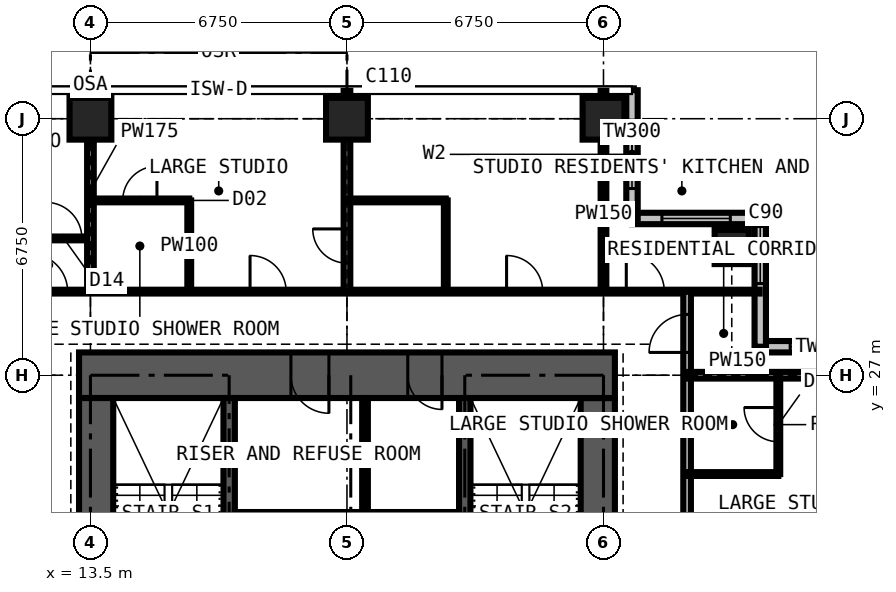
"""IFC4 building model, lengths in metres.
Left out: names, types, materials, properties, quantities, classifications, styles, units other than length and angle.
Written with IfcOpenShell. Run it as: python <this file> out.ifc"""

import sys

from ifc_helpers import new_model, si_unit, direction, frame, frame_2d, origin, origin_2d, place, context, subcontext, project, spatial, rectangle, extrude, element, fill, save


model = new_model("IFC4")
c1 = context("Model", 3, precision=1e-05, world=origin(), true_north=direction((0.0, 1.0)))
c2 = subcontext(c1, "Body", "Model", "MODEL_VIEW")
j1 = project(units=[si_unit("LENGTHUNIT", "METRE"), si_unit("PLANEANGLEUNIT", "RADIAN")], contexts=[c1])
p1 = place(None, origin())
s1 = spatial("IfcSite", under=j1, at=p1, CompositionType="ELEMENT")
p2 = place(p1, origin())
s2 = spatial("IfcBuilding", under=s1, at=p2, CompositionType="ELEMENT")
p3 = place(p2, frame((0.0, 0.0, 215.1)))
s3 = spatial("IfcBuildingStorey", under=s2, at=p3, CompositionType="ELEMENT", Elevation=215.1)
for number, where, z_axis, x_axis in (
    (1, (13.5, 33.75, 0.0), (0.0, 0.0, 1.0), (1.0, 0.0, 0.0)),
    (2, (20.25, 33.75, 0.0), (0.0, 0.0, 1.0), (1.0, 0.0, 0.0)),
    (3, (27.0, 33.75, 0.0), (0.0, 0.0, 1.0), (1.0, 0.0, 0.0)),
):
    element("IfcColumn", number, at=place(p3, frame(where, z_axis=z_axis, x_axis=x_axis)), inside=s3, PredefinedType="COLUMN", context=c2, shape_type="SweptSolid", body=[
        extrude(rectangle(XDim=1.1, YDim=1.1, at=origin_2d()), origin(), (0.0, 0.0, 1.0), 3.6),
    ])
p4 = place(p3, frame((30.375, 30.375, 0.0), z_axis=(0.0, 0.0, 1.0), x_axis=(1.0, 0.0, 0.0)))
e4 = element("IfcColumn", 4, at=p4, inside=s3, PredefinedType="COLUMN", context=c2, shape_type="SweptSolid", body=[
    extrude(rectangle(XDim=0.9, YDim=0.9, at=origin_2d()), origin(), (0.0, 0.0, 1.0), 3.6),
])
p5 = place(p3, frame((26.85, 14.1, 0.0), z_axis=(0.0, 0.0, 1.0), x_axis=(0.0, 1.0, 0.0)))
e5 = element("IfcWall", 5, at=p5, inside=s3, PredefinedType="SHEAR", context=c2, shape_type="SweptSolid", body=[
    extrude(rectangle(XDim=12.3, YDim=0.9, at=frame_2d((6.15, 0.0))), origin(), (0.0, 0.0, 1.0), 3.6),
])
p6 = place(p5, frame((3.65, 0.0, 0.0)))
e6 = element("IfcOpeningElement", 6, at=p6, cuts=e5, PredefinedType="OPENING", context=c2, shape_type="SweptSolid", body=[
    extrude(rectangle(XDim=1.2, YDim=2.2, at=frame_2d((0.6, 1.1))), frame((0.0, 0.46, 0.0), z_axis=(0.0, -1.0, 0.0), x_axis=(1.0, 0.0, 0.0)), (0.0, 0.0, 1.0), 0.92),
])
p7 = place(p3, frame((27.3, 27.0, 0.0), z_axis=(0.0, 0.0, 1.0), x_axis=(-1.0, 0.0, 0.0)))
e7 = element("IfcWall", 7, at=p7, inside=s3, PredefinedType="SHEAR", context=c2, shape_type="SweptSolid", body=[
    extrude(rectangle(XDim=14.1, YDim=1.2, at=frame_2d((7.05, 0.0))), origin(), (0.0, 0.0, 1.0), 3.6),
])
p8 = place(p7, frame((4.55, 0.0, 0.0)))
e8 = element("IfcOpeningElement", 8, at=p8, cuts=e7, PredefinedType="OPENING", context=c2, shape_type="SweptSolid", body=[
    extrude(rectangle(XDim=0.9, YDim=2.2, at=frame_2d((0.45, 1.1))), frame((0.0, 0.61, 0.0), z_axis=(0.0, -1.0, 0.0), x_axis=(1.0, 0.0, 0.0)), (0.0, 0.0, 1.0), 1.22),
])
p9 = place(p7, frame((7.525, 0.0, 0.0)))
e9 = element("IfcOpeningElement", 9, at=p9, cuts=e7, PredefinedType="OPENING", context=c2, shape_type="SweptSolid", body=[
    extrude(rectangle(XDim=1.0, YDim=2.2, at=frame_2d((0.5, 1.1))), frame((0.0, 0.61, 0.0), z_axis=(0.0, -1.0, 0.0), x_axis=(1.0, 0.0, 0.0)), (0.0, 0.0, 1.0), 1.22),
])
p10 = place(p3, frame((13.65, 26.4, 0.0), z_axis=(0.0, 0.0, 1.0), x_axis=(0.0, -1.0, 0.0)))
e10 = element("IfcWall", 10, at=p10, inside=s3, PredefinedType="SHEAR", context=c2, shape_type="SweptSolid", body=[
    extrude(rectangle(XDim=12.3, YDim=0.9, at=frame_2d((6.15, 0.0))), origin(), (0.0, 0.0, 1.0), 3.6),
])
p11 = place(p10, frame((7.45, 0.0, 0.0)))
e11 = element("IfcOpeningElement", 11, at=p11, cuts=e10, PredefinedType="OPENING", context=c2, shape_type="SweptSolid", body=[
    extrude(rectangle(XDim=1.2, YDim=2.2, at=frame_2d((0.6, 1.1))), frame((0.0, 0.46, 0.0), z_axis=(0.0, -1.0, 0.0), x_axis=(1.0, 0.0, 0.0)), (0.0, 0.0, 1.0), 0.92),
])
p12 = place(p3, frame((34.5, 27.75, 0.0), z_axis=(0.0, 0.0, 1.0), x_axis=(-1.0, 0.0, 0.0)))
e12 = element("IfcWall", 12, at=p12, inside=s3, PredefinedType="SOLIDWALL", context=c2, shape_type="SweptSolid", body=[
    extrude(rectangle(XDim=3.375, YDim=0.3, at=frame_2d((1.688, 0.0))), origin(), (0.0, 0.0, 1.0), 3.375),
])
p13 = place(p12, frame((0.788, 0.0, 0.6)))
e13 = element("IfcOpeningElement", 13, at=p13, cuts=e12, PredefinedType="OPENING", context=c2, shape_type="SweptSolid", body=[
    extrude(rectangle(XDim=1.8, YDim=2.1, at=frame_2d((0.9, 1.05))), frame((0.0, 0.16, 0.0), z_axis=(0.0, -1.0, 0.0), x_axis=(1.0, 0.0, 0.0)), (0.0, 0.0, 1.0), 0.32),
])
p14 = place(p3, frame((31.125, 27.75, 0.0), z_axis=(0.0, 0.0, 1.0), x_axis=(0.0, 1.0, 0.0)))
e14 = element("IfcWall", 14, at=p14, inside=s3, PredefinedType="SOLIDWALL", context=c2, shape_type="SweptSolid", body=[
    extrude(rectangle(XDim=3.375, YDim=0.3, at=frame_2d((1.688, 0.0))), origin(), (0.0, 0.0, 1.0), 3.375),
])
p15 = place(p14, frame((1.663, 0.0, 0.9)))
e15 = element("IfcOpeningElement", 15, at=p15, cuts=e14, PredefinedType="OPENING", context=c2, shape_type="SweptSolid", body=[
    extrude(rectangle(XDim=1.5, YDim=1.8, at=frame_2d((0.75, 0.9))), frame((0.0, 0.16, 0.0), z_axis=(0.0, -1.0, 0.0), x_axis=(1.0, 0.0, 0.0)), (0.0, 0.0, 1.0), 0.32),
])
p16 = place(p3, frame((31.125, 31.125, 0.0), z_axis=(0.0, 0.0, 1.0), x_axis=(-1.0, 0.0, 0.0)))
e16 = element("IfcWall", 16, at=p16, inside=s3, PredefinedType="SOLIDWALL", context=c2, shape_type="SweptSolid", body=[
    extrude(rectangle(XDim=3.375, YDim=0.3, at=frame_2d((1.688, 0.0))), origin(), (0.0, 0.0, 1.0), 3.375),
])
p17 = place(p16, frame((0.788, 0.0, 0.6)))
e17 = element("IfcOpeningElement", 17, at=p17, cuts=e16, PredefinedType="OPENING", context=c2, shape_type="SweptSolid", body=[
    extrude(rectangle(XDim=1.8, YDim=2.1, at=frame_2d((0.9, 1.05))), frame((0.0, 0.16, 0.0), z_axis=(0.0, -1.0, 0.0), x_axis=(1.0, 0.0, 0.0)), (0.0, 0.0, 1.0), 0.32),
])
p18 = place(p3, frame((27.75, 31.125, 0.0), z_axis=(0.0, 0.0, 1.0), x_axis=(0.0, 1.0, 0.0)))
e18 = element("IfcWall", 18, at=p18, inside=s3, PredefinedType="SOLIDWALL", context=c2, shape_type="SweptSolid", body=[
    extrude(rectangle(XDim=3.375, YDim=0.3, at=frame_2d((1.688, 0.0))), origin(), (0.0, 0.0, 1.0), 3.375),
])
p19 = place(p18, frame((0.788, 0.0, 0.6)))
e19 = element("IfcOpeningElement", 19, at=p19, cuts=e18, PredefinedType="OPENING", context=c2, shape_type="SweptSolid", body=[
    extrude(rectangle(XDim=1.8, YDim=2.1, at=frame_2d((0.9, 1.05))), frame((0.0, 0.16, 0.0), z_axis=(0.0, -1.0, 0.0), x_axis=(1.0, 0.0, 0.0)), (0.0, 0.0, 1.0), 0.32),
])
for number, where, z_axis, x_axis in (
    (20, (17.15, 20.3, 0.0), (0.0, 0.0, 1.0), (0.0, 1.0, 0.0)),
    (21, (23.35, 20.3, 0.0), (0.0, 0.0, 1.0), (0.0, 1.0, 0.0)),
):
    element("IfcWall", number, at=place(p3, frame(where, z_axis=z_axis, x_axis=x_axis)), inside=s3, PredefinedType="SHEAR", context=c2, shape_type="SweptSolid", body=[
        extrude(rectangle(XDim=6.1, YDim=0.3, at=frame_2d((3.05, 0.0))), origin(), (0.0, 0.0, 1.0), 3.6),
    ])
p20 = place(p3, frame((17.3, 23.25, 0.0), z_axis=(0.0, 0.0, 1.0), x_axis=(1.0, 0.0, 0.0)))
e22 = element("IfcWall", 22, at=p20, inside=s3, PredefinedType="SHEAR", context=c2, shape_type="SweptSolid", body=[
    extrude(rectangle(XDim=5.9, YDim=0.3, at=frame_2d((2.95, 0.0))), origin(), (0.0, 0.0, 1.0), 3.6),
])
p21 = place(p3, frame((20.725, 23.4, 0.0), z_axis=(0.0, 0.0, 1.0), x_axis=(0.0, 1.0, 0.0)))
e23 = element("IfcWall", 23, at=p21, inside=s3, PredefinedType="PARTITIONING", context=c2, shape_type="SweptSolid", body=[
    extrude(rectangle(XDim=3.0, YDim=0.15, at=frame_2d((1.5, 0.0))), origin(), (0.0, 0.0, 1.0), 3.375),
])
p22 = place(p3, frame((10.125, 30.6, 0.0), z_axis=(0.0, 0.0, 1.0), x_axis=(1.0, 0.0, 0.0)))
e24 = element("IfcWall", 24, at=p22, inside=s3, PredefinedType="PARTITIONING", context=c2, shape_type="SweptSolid", body=[
    extrude(rectangle(XDim=3.375, YDim=0.1, at=frame_2d((1.688, 0.0))), origin(), (0.0, 0.0, 1.0), 3.375),
])
p23 = place(p22, frame((2.2, 0.0, 0.0)))
e25 = element("IfcOpeningElement", 25, at=p23, cuts=e24, PredefinedType="OPENING", context=c2, shape_type="SweptSolid", body=[
    extrude(rectangle(XDim=0.95, YDim=2.2, at=frame_2d((0.475, 1.1))), frame((0.0, 0.06, 0.0), z_axis=(0.0, -1.0, 0.0), x_axis=(1.0, 0.0, 0.0)), (0.0, 0.0, 1.0), 0.12),
])
p24 = place(p3, frame((11.3, 29.2, 0.0), z_axis=(0.0, 0.0, 1.0), x_axis=(1.0, 0.0, 0.0)))
e26 = element("IfcWall", 26, at=p24, inside=s3, PredefinedType="PARTITIONING", context=c2, shape_type="SweptSolid", body=[
    extrude(rectangle(XDim=19.809, YDim=0.1, at=frame_2d((9.904, 0.0))), origin(), (0.0, 0.0, 1.0), 3.375),
])
p25 = place(p24, frame((16.3, 0.0, 0.0)))
e27 = element("IfcOpeningElement", 27, at=p25, cuts=e26, PredefinedType="OPENING", context=c2, shape_type="SweptSolid", body=[
    extrude(rectangle(XDim=1.0, YDim=2.2, at=frame_2d((0.5, 1.1))), frame((0.0, 0.06, 0.0), z_axis=(0.0, -1.0, 0.0), x_axis=(1.0, 0.0, 0.0)), (0.0, 0.0, 1.0), 0.12),
])
p26 = place(p24, frame((6.4, 0.0, 0.0)))
e28 = element("IfcOpeningElement", 28, at=p26, cuts=e26, PredefinedType="OPENING", context=c2, shape_type="SweptSolid", body=[
    extrude(rectangle(XDim=0.95, YDim=2.2, at=frame_2d((0.475, 1.1))), frame((0.0, 0.06, 0.0), z_axis=(0.0, -1.0, 0.0), x_axis=(1.0, 0.0, 0.0)), (0.0, 0.0, 1.0), 0.12),
])
p27 = place(p24, frame((13.15, 0.0, 0.0)))
e29 = element("IfcOpeningElement", 29, at=p27, cuts=e26, PredefinedType="OPENING", context=c2, shape_type="SweptSolid", body=[
    extrude(rectangle(XDim=0.95, YDim=2.2, at=frame_2d((0.475, 1.1))), frame((0.0, 0.06, 0.0), z_axis=(0.0, -1.0, 0.0), x_axis=(1.0, 0.0, 0.0)), (0.0, 0.0, 1.0), 0.12),
])
p28 = place(p24, frame((0.6, 0.0, 0.0)))
e30 = element("IfcOpeningElement", 30, at=p28, cuts=e26, PredefinedType="OPENING", context=c2, shape_type="SweptSolid", body=[
    extrude(rectangle(XDim=1.0, YDim=2.2, at=frame_2d((0.5, 1.1))), frame((0.0, 0.06, 0.0), z_axis=(0.0, -1.0, 0.0), x_axis=(1.0, 0.0, 0.0)), (0.0, 0.0, 1.0), 0.12),
])
p29 = place(p3, frame((13.5, 29.2, 0.0), z_axis=(0.0, 0.0, 1.0), x_axis=(0.0, 1.0, 0.0)))
e31 = element("IfcWall", 31, at=p29, inside=s3, PredefinedType="PARTITIONING", context=c2, shape_type="SweptSolid", body=[
    extrude(rectangle(XDim=5.284, YDim=0.175, at=frame_2d((2.642, 0.0))), origin(), (0.0, 0.0, 1.0), 2.61),
])
p30 = place(p3, frame((13.5, 31.6, 0.0), z_axis=(0.0, 0.0, 1.0), x_axis=(1.0, 0.0, 0.0)))
e32 = element("IfcWall", 32, at=p30, inside=s3, PredefinedType="PARTITIONING", context=c2, shape_type="SweptSolid", body=[
    extrude(rectangle(XDim=2.6, YDim=0.1, at=frame_2d((1.3, 0.0))), origin(), (0.0, 0.0, 1.0), 3.375),
])
p31 = place(p30, frame((0.85, 0.0, 0.0)))
e33 = element("IfcOpeningElement", 33, at=p31, cuts=e32, PredefinedType="OPENING", context=c2, shape_type="SweptSolid", body=[
    extrude(rectangle(XDim=0.9, YDim=2.2, at=frame_2d((0.45, 1.1))), frame((0.0, 0.06, 0.0), z_axis=(0.0, -1.0, 0.0), x_axis=(1.0, 0.0, 0.0)), (0.0, 0.0, 1.0), 0.12),
])
p32 = place(p3, frame((16.1, 29.2, 0.0), z_axis=(0.0, 0.0, 1.0), x_axis=(0.0, 1.0, 0.0)))
e34 = element("IfcWall", 34, at=p32, inside=s3, PredefinedType="PARTITIONING", context=c2, shape_type="SweptSolid", body=[
    extrude(rectangle(XDim=2.4, YDim=0.1, at=frame_2d((1.2, 0.0))), origin(), (0.0, 0.0, 1.0), 3.375),
])
p33 = place(p3, frame((20.25, 29.2, 0.0), z_axis=(0.0, 0.0, 1.0), x_axis=(0.0, 1.0, 0.0)))
e35 = element("IfcWall", 35, at=p33, inside=s3, PredefinedType="PARTITIONING", context=c2, shape_type="SweptSolid", body=[
    extrude(rectangle(XDim=5.284, YDim=0.175, at=frame_2d((2.642, 0.0))), origin(), (0.0, 0.0, 1.0), 2.61),
])
p34 = place(p33, frame((0.75, 0.0, 0.0)))
e36 = element("IfcOpeningElement", 36, at=p34, cuts=e35, PredefinedType="OPENING", context=c2, shape_type="SweptSolid", body=[
    extrude(rectangle(XDim=0.9, YDim=2.2, at=frame_2d((0.45, 1.1))), frame((0.0, 0.097, 0.0), z_axis=(0.0, -1.0, 0.0), x_axis=(1.0, 0.0, 0.0)), (0.0, 0.0, 1.0), 0.195),
])
p35 = place(p3, frame((20.25, 31.6, 0.0), z_axis=(0.0, 0.0, 1.0), x_axis=(1.0, 0.0, 0.0)))
e37 = element("IfcWall", 37, at=p35, inside=s3, PredefinedType="PARTITIONING", context=c2, shape_type="SweptSolid", body=[
    extrude(rectangle(XDim=2.6, YDim=0.1, at=frame_2d((1.3, 0.0))), origin(), (0.0, 0.0, 1.0), 3.375),
])
p36 = place(p3, frame((22.85, 29.2, 0.0), z_axis=(0.0, 0.0, 1.0), x_axis=(0.0, 1.0, 0.0)))
e38 = element("IfcWall", 38, at=p36, inside=s3, PredefinedType="PARTITIONING", context=c2, shape_type="SweptSolid", body=[
    extrude(rectangle(XDim=2.4, YDim=0.1, at=frame_2d((1.2, 0.0))), origin(), (0.0, 0.0, 1.0), 3.375),
])
p37 = place(p3, frame((27.0, 29.2, 0.0), z_axis=(0.0, 0.0, 1.0), x_axis=(0.0, 1.0, 0.0)))
e39 = element("IfcWall", 39, at=p37, inside=s3, PredefinedType="PARTITIONING", context=c2, shape_type="SweptSolid", body=[
    extrude(rectangle(XDim=5.284, YDim=0.15, at=frame_2d((2.642, 0.0))), origin(), (0.0, 0.0, 1.0), 2.877),
])
p38 = place(p3, frame((29.2, 11.3, 0.0), z_axis=(0.0, 0.0, 1.0), x_axis=(0.0, 1.0, 0.0)))
e40 = element("IfcWall", 40, at=p38, inside=s3, PredefinedType="PARTITIONING", context=c2, shape_type="SweptSolid", body=[
    extrude(rectangle(XDim=17.9, YDim=0.2, at=frame_2d((8.95, 0.0))), origin(), (0.0, 0.0, 1.0), 3.375),
])
p39 = place(p38, frame((0.6, 0.0, 0.0)))
e41 = element("IfcOpeningElement", 41, at=p39, cuts=e40, PredefinedType="OPENING", context=c2, shape_type="SweptSolid", body=[
    extrude(rectangle(XDim=1.0, YDim=2.2, at=frame_2d((0.5, 1.1))), frame((0.0, 0.11, 0.0), z_axis=(0.0, -1.0, 0.0), x_axis=(1.0, 0.0, 0.0)), (0.0, 0.0, 1.0), 0.22),
])
p40 = place(p38, frame((10.55, 0.0, 0.0)))
e42 = element("IfcOpeningElement", 42, at=p40, cuts=e40, PredefinedType="OPENING", context=c2, shape_type="SweptSolid", body=[
    extrude(rectangle(XDim=0.95, YDim=2.2, at=frame_2d((0.475, 1.1))), frame((0.0, 0.11, 0.0), z_axis=(0.0, -1.0, 0.0), x_axis=(1.0, 0.0, 0.0)), (0.0, 0.0, 1.0), 0.22),
])
p41 = place(p38, frame((3.8, 0.0, 0.0)))
e43 = element("IfcOpeningElement", 43, at=p41, cuts=e40, PredefinedType="OPENING", context=c2, shape_type="SweptSolid", body=[
    extrude(rectangle(XDim=0.95, YDim=2.2, at=frame_2d((0.475, 1.1))), frame((0.0, 0.11, 0.0), z_axis=(0.0, -1.0, 0.0), x_axis=(1.0, 0.0, 0.0)), (0.0, 0.0, 1.0), 0.22),
])
p42 = place(p38, frame((16.3, 0.0, 0.0)))
e44 = element("IfcOpeningElement", 44, at=p42, cuts=e40, PredefinedType="OPENING", context=c2, shape_type="SweptSolid", body=[
    extrude(rectangle(XDim=1.0, YDim=2.2, at=frame_2d((0.5, 1.1))), frame((0.0, 0.11, 0.0), z_axis=(0.0, -1.0, 0.0), x_axis=(1.0, 0.0, 0.0)), (0.0, 0.0, 1.0), 0.22),
])
p43 = place(p3, frame((29.2, 24.4, 0.0), z_axis=(0.0, 0.0, 1.0), x_axis=(1.0, 0.0, 0.0)))
e45 = element("IfcWall", 45, at=p43, inside=s3, PredefinedType="PARTITIONING", context=c2, shape_type="SweptSolid", body=[
    extrude(rectangle(XDim=2.4, YDim=0.1, at=frame_2d((1.2, 0.0))), origin(), (0.0, 0.0, 1.0), 3.375),
])
p44 = place(p3, frame((29.2, 27.0, 0.0), z_axis=(0.0, 0.0, 1.0), x_axis=(1.0, 0.0, 0.0)))
e46 = element("IfcWall", 46, at=p44, inside=s3, PredefinedType="PARTITIONING", context=c2, shape_type="SweptSolid", body=[
    extrude(rectangle(XDim=5.284, YDim=0.175, at=frame_2d((2.642, 0.0))), origin(), (0.0, 0.0, 1.0), 2.877),
])
p45 = place(p3, frame((31.125, 27.0, 0.0), z_axis=(0.0, 0.0, 1.0), x_axis=(0.0, 1.0, 0.0)))
e47 = element("IfcWall", 47, at=p45, inside=s3, PredefinedType="PARTITIONING", context=c2, shape_type="SweptSolid", body=[
    extrude(rectangle(XDim=0.734, YDim=0.15, at=frame_2d((0.367, 0.0))), origin(), (0.0, 0.0, 1.0), 3.375),
])
p46 = place(p3, frame((31.6, 24.4, 0.0), z_axis=(0.0, 0.0, 1.0), x_axis=(0.0, 1.0, 0.0)))
e48 = element("IfcWall", 48, at=p46, inside=s3, PredefinedType="PARTITIONING", context=c2, shape_type="SweptSolid", body=[
    extrude(rectangle(XDim=2.6, YDim=0.1, at=frame_2d((1.3, 0.0))), origin(), (0.0, 0.0, 1.0), 3.375),
])
p47 = place(p46, frame((0.85, 0.0, 0.0)))
e49 = element("IfcOpeningElement", 49, at=p47, cuts=e48, PredefinedType="OPENING", context=c2, shape_type="SweptSolid", body=[
    extrude(rectangle(XDim=0.9, YDim=2.2, at=frame_2d((0.45, 1.1))), frame((0.0, 0.06, 0.0), z_axis=(0.0, -1.0, 0.0), x_axis=(1.0, 0.0, 0.0)), (0.0, 0.0, 1.0), 0.12),
])
p48 = place(p13, origin())
e50 = element("IfcWindow", 50, at=p48, inside=s3, PartitioningType="SINGLE_PANEL", PredefinedType="WINDOW", context=c2, shape_type="SweptSolid", body=[
    extrude(rectangle(XDim=1.8, YDim=2.1, at=frame_2d((0.9, 1.05))), frame((0.0, 0.03, 0.0), z_axis=(0.0, -1.0, 0.0), x_axis=(1.0, 0.0, 0.0)), (0.0, 0.0, 1.0), 0.06),
])
fill(e13, e50)
p49 = place(p15, origin())
e51 = element("IfcWindow", 51, at=p49, inside=s3, PartitioningType="SINGLE_PANEL", PredefinedType="WINDOW", context=c2, shape_type="SweptSolid", body=[
    extrude(rectangle(XDim=1.5, YDim=1.8, at=frame_2d((0.75, 0.9))), frame((0.0, 0.03, 0.0), z_axis=(0.0, -1.0, 0.0), x_axis=(1.0, 0.0, 0.0)), (0.0, 0.0, 1.0), 0.06),
])
fill(e15, e51)
p50 = place(p17, origin())
e52 = element("IfcWindow", 52, at=p50, inside=s3, PartitioningType="SINGLE_PANEL", PredefinedType="WINDOW", context=c2, shape_type="SweptSolid", body=[
    extrude(rectangle(XDim=1.8, YDim=2.1, at=frame_2d((0.9, 1.05))), frame((0.0, 0.03, 0.0), z_axis=(0.0, -1.0, 0.0), x_axis=(1.0, 0.0, 0.0)), (0.0, 0.0, 1.0), 0.06),
])
fill(e17, e52)
p51 = place(p19, origin())
e53 = element("IfcWindow", 53, at=p51, inside=s3, PartitioningType="SINGLE_PANEL", PredefinedType="WINDOW", context=c2, shape_type="SweptSolid", body=[
    extrude(rectangle(XDim=1.8, YDim=2.1, at=frame_2d((0.9, 1.05))), frame((0.0, 0.03, 0.0), z_axis=(0.0, -1.0, 0.0), x_axis=(1.0, 0.0, 0.0)), (0.0, 0.0, 1.0), 0.06),
])
fill(e19, e53)
p52 = place(p8, origin())
e54 = element("IfcDoor", 54, at=p52, inside=s3, OperationType="SINGLE_SWING_LEFT", PredefinedType="DOOR", context=c2, shape_type="SweptSolid", body=[
    extrude(rectangle(XDim=0.9, YDim=2.2, at=frame_2d((0.45, 1.1))), frame((0.0, 0.4, 0.0), z_axis=(0.0, -1.0, 0.0), x_axis=(1.0, 0.0, 0.0)), (0.0, 0.0, 1.0), 0.8),
])
fill(e8, e54)
p53 = place(p9, origin())
e55 = element("IfcDoor", 55, at=p53, inside=s3, OperationType="SINGLE_SWING_LEFT", PredefinedType="DOOR", context=c2, shape_type="SweptSolid", body=[
    extrude(rectangle(XDim=1.0, YDim=2.2, at=frame_2d((0.5, 1.1))), frame((0.0, 0.025, 0.0), z_axis=(0.0, -1.0, 0.0), x_axis=(1.0, 0.0, 0.0)), (0.0, 0.0, 1.0), 0.05),
])
fill(e9, e55)
p54 = place(p47, origin())
e56 = element("IfcDoor", 56, at=p54, inside=s3, OperationType="SINGLE_SWING_RIGHT", PredefinedType="DOOR", context=c2, shape_type="SweptSolid", body=[
    extrude(rectangle(XDim=0.9, YDim=2.2, at=frame_2d((0.45, 1.1))), frame((0.0, 0.025, 0.0), z_axis=(0.0, -1.0, 0.0), x_axis=(1.0, 0.0, 0.0)), (0.0, 0.0, 1.0), 0.05),
])
fill(e49, e56)
p55 = place(p42, origin())
e57 = element("IfcDoor", 57, at=p55, inside=s3, OperationType="SINGLE_SWING_LEFT", PredefinedType="DOOR", context=c2, shape_type="SweptSolid", body=[
    extrude(rectangle(XDim=1.0, YDim=2.2, at=frame_2d((0.5, 1.1))), frame((0.0, 0.025, 0.0), z_axis=(0.0, -1.0, 0.0), x_axis=(1.0, 0.0, 0.0)), (0.0, 0.0, 1.0), 0.05),
])
fill(e44, e57)
p56 = place(p25, origin())
e58 = element("IfcDoor", 58, at=p56, inside=s3, OperationType="SINGLE_SWING_LEFT", PredefinedType="DOOR", context=c2, shape_type="SweptSolid", body=[
    extrude(rectangle(XDim=1.0, YDim=2.2, at=frame_2d((0.5, 1.1))), frame((0.0, 0.025, 0.0), z_axis=(0.0, -1.0, 0.0), x_axis=(1.0, 0.0, 0.0)), (0.0, 0.0, 1.0), 0.05),
])
fill(e27, e58)
p57 = place(p26, origin())
e59 = element("IfcDoor", 59, at=p57, inside=s3, OperationType="SINGLE_SWING_LEFT", PredefinedType="DOOR", context=c2, shape_type="SweptSolid", body=[
    extrude(rectangle(XDim=0.95, YDim=2.2, at=frame_2d((0.475, 1.1))), frame((0.0, 0.025, 0.0), z_axis=(0.0, -1.0, 0.0), x_axis=(1.0, 0.0, 0.0)), (0.0, 0.0, 1.0), 0.05),
])
fill(e28, e59)
p58 = place(p31, origin())
e60 = element("IfcDoor", 60, at=p58, inside=s3, OperationType="SINGLE_SWING_RIGHT", PredefinedType="DOOR", context=c2, shape_type="SweptSolid", body=[
    extrude(rectangle(XDim=0.9, YDim=2.2, at=frame_2d((0.45, 1.1))), frame((0.0, 0.025, 0.0), z_axis=(0.0, -1.0, 0.0), x_axis=(1.0, 0.0, 0.0)), (0.0, 0.0, 1.0), 0.05),
])
fill(e33, e60)
p59 = place(p27, origin())
e61 = element("IfcDoor", 61, at=p59, inside=s3, OperationType="SINGLE_SWING_LEFT", PredefinedType="DOOR", context=c2, shape_type="SweptSolid", body=[
    extrude(rectangle(XDim=0.95, YDim=2.2, at=frame_2d((0.475, 1.1))), frame((0.0, 0.025, 0.0), z_axis=(0.0, -1.0, 0.0), x_axis=(1.0, 0.0, 0.0)), (0.0, 0.0, 1.0), 0.05),
])
fill(e29, e61)
p60 = place(p34, origin())
e62 = element("IfcDoor", 62, at=p60, inside=s3, OperationType="SINGLE_SWING_RIGHT", PredefinedType="DOOR", context=c2, shape_type="SweptSolid", body=[
    extrude(rectangle(XDim=0.9, YDim=2.2, at=frame_2d((0.45, 1.1))), frame((0.0, 0.025, 0.0), z_axis=(0.0, -1.0, 0.0), x_axis=(1.0, 0.0, 0.0)), (0.0, 0.0, 1.0), 0.05),
])
fill(e36, e62)
p61 = place(p23, origin())
e63 = element("IfcDoor", 63, at=p61, inside=s3, OperationType="SINGLE_SWING_LEFT", PredefinedType="DOOR", context=c2, shape_type="SweptSolid", body=[
    extrude(rectangle(XDim=0.95, YDim=2.2, at=frame_2d((0.475, 1.1))), frame((0.0, 0.025, 0.0), z_axis=(0.0, -1.0, 0.0), x_axis=(1.0, 0.0, 0.0)), (0.0, 0.0, 1.0), 0.05),
])
fill(e25, e63)
p62 = place(p28, origin())
e64 = element("IfcDoor", 64, at=p62, inside=s3, OperationType="SINGLE_SWING_LEFT", PredefinedType="DOOR", context=c2, shape_type="SweptSolid", body=[
    extrude(rectangle(XDim=1.0, YDim=2.2, at=frame_2d((0.5, 1.1))), frame((0.0, 0.025, 0.0), z_axis=(0.0, -1.0, 0.0), x_axis=(1.0, 0.0, 0.0)), (0.0, 0.0, 1.0), 0.05),
])
fill(e30, e64)
save(model, sys.argv[1])
